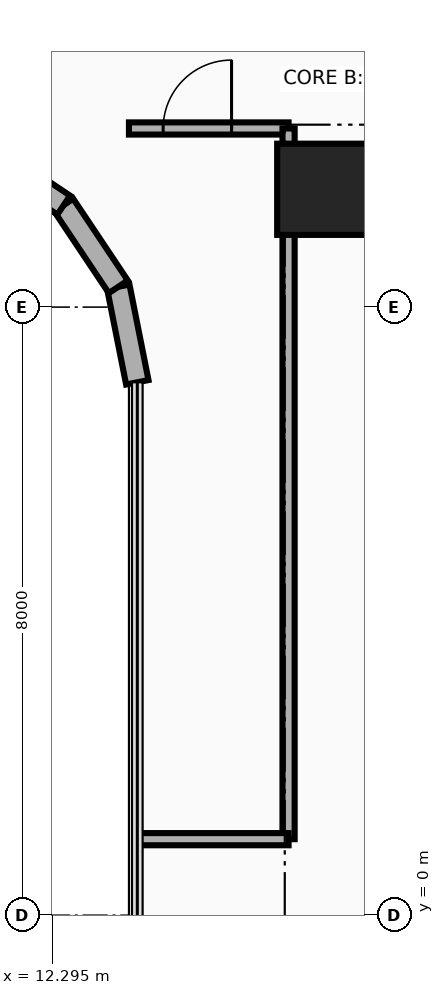
"""IFC4 building model, lengths in metres.
Left out: names, types, materials, properties, quantities, classifications, styles, units other than length and angle.
Written with IfcOpenShell. Run it as: python <this file> out.ifc"""

import sys

from ifc_helpers import new_model, si_unit, direction, frame, frame_2d, origin, origin_2d, place, context, subcontext, project, spatial, rectangle, extrude, source, transform, mapped, element, fill, save


model = new_model("IFC4")
c1 = context("Model", 3, precision=1e-05, world=origin(), true_north=direction((0.0, 1.0)))
c2 = subcontext(c1, "Body", "Model", "MODEL_VIEW")
j1 = project(units=[si_unit("LENGTHUNIT", "METRE"), si_unit("PLANEANGLEUNIT", "RADIAN")], contexts=[c1])
p1 = place(None, origin())
s1 = spatial("IfcSite", under=j1, at=p1, CompositionType="ELEMENT")
p2 = place(p1, origin())
s2 = spatial("IfcBuilding", under=s1, at=p2, CompositionType="ELEMENT")
p3 = place(p2, frame((0.0, 0.0, 135.3)))
s3 = spatial("IfcBuildingStorey", under=s2, at=p3, CompositionType="ELEMENT", Elevation=135.3)
p4 = place(p3, frame((15.85, 9.55, 0.0), z_axis=(0.0, 0.0, 1.0), x_axis=(1.0, 0.0, 0.0)))
e1 = element("IfcWall", 1, at=p4, inside=s3, PredefinedType="SHEAR", context=c2, shape_type="SweptSolid", body=[
    extrude(rectangle(XDim=9.0, YDim=0.7, at=frame_2d((4.5, 0.0))), origin(), (0.0, 0.0, 1.0), 3.46),
])
m1 = source(origin(), c2, "Body", "SweptSolid", [
    extrude(rectangle(XDim=1.2, YDim=1.2, at=origin_2d()), origin(), (0.0, 0.0, 1.0), 3.7),
])
p5 = place(p3, frame((15.85, 9.55, 0.0), z_axis=(0.0, 0.0, 1.0), x_axis=(1.0, 0.0, 0.0)))
e2 = element("IfcColumn", 2, at=p5, inside=s3, PredefinedType="COLUMN", context=c2, shape_type="MappedRepresentation", body=[
    mapped(m1, transform((0.0, 0.0, 0.0), x_axis=(1.0, 0.0, 0.0), y_axis=(0.0, 1.0, 0.0), z_axis=(0.0, 0.0, 1.0), scale=1.0)),
])
p6 = place(p3, frame((13.41, 7.011, 0.0), z_axis=(0.0, 0.0, 1.0), x_axis=(-0.195090163074, 0.980785312019, 0.0)))
e3 = element("IfcWall", 3, at=p6, inside=s3, PredefinedType="SOLIDWALL", context=c2, shape_type="SweptSolid", body=[
    extrude(rectangle(XDim=1.281, YDim=0.3, at=frame_2d((0.641, 0.0))), origin(), (0.0, 0.0, 1.0), 3.46),
])
for number, where, z_axis, x_axis in (
    (4, (13.16, 8.268, 0.0), (0.0, 0.0, 1.0), (-0.556, 0.831, 0.0)),
    (5, (12.442, 9.342, 0.0), (0.0, 0.0, 1.0), (-0.831, 0.556, 0.0)),
):
    element("IfcWall", number, at=place(p3, frame(where, z_axis=z_axis, x_axis=x_axis)), inside=s3, PredefinedType="SOLIDWALL", context=c2, shape_type="SweptSolid", body=[
        extrude(rectangle(XDim=1.292, YDim=0.3, at=frame_2d((0.646, 0.0))), origin(), (0.0, 0.0, 1.0), 3.46),
    ])
p7 = place(p3, frame((13.3, 10.35, 0.0), z_axis=(0.0, 0.0, 1.0), x_axis=(1.0, 0.0, 0.0)))
e6 = element("IfcWall", 6, at=p7, inside=s3, PredefinedType="PARTITIONING", context=c2, shape_type="SweptSolid", body=[
    extrude(rectangle(XDim=2.1, YDim=0.16, at=frame_2d((1.05, 0.0))), origin(), (0.0, 0.0, 1.0), 2.666),
])
p8 = place(p7, frame((0.45, 0.0, 0.0)))
e7 = element("IfcOpeningElement", 7, at=p8, cuts=e6, PredefinedType="OPENING", context=c2, shape_type="SweptSolid", body=[
    extrude(rectangle(XDim=0.9, YDim=2.1, at=frame_2d((0.45, 1.05))), frame((0.0, 0.095, 0.0), z_axis=(0.0, -1.0, 0.0), x_axis=(1.0, 0.0, 0.0)), (0.0, 0.0, 1.0), 0.19),
])
p9 = place(p3, frame((15.4, 1.0, 0.0), z_axis=(0.0, 0.0, 1.0), x_axis=(0.0, 1.0, 0.0)))
e8 = element("IfcWall", 8, at=p9, inside=s3, PredefinedType="PARTITIONING", context=c2, shape_type="SweptSolid", body=[
    extrude(rectangle(XDim=9.35, YDim=0.16, at=frame_2d((4.675, 0.0))), origin(), (0.0, 0.0, 1.0), 2.245),
])
p10 = place(p3, frame((13.41, 1.0, 0.0), z_axis=(0.0, 0.0, 1.0), x_axis=(1.0, 0.0, 0.0)))
e9 = element("IfcWall", 9, at=p10, inside=s3, PredefinedType="PARTITIONING", context=c2, shape_type="SweptSolid", body=[
    extrude(rectangle(XDim=1.99, YDim=0.16, at=frame_2d((0.995, 0.0))), origin(), (0.0, 0.0, 1.0), 2.245),
])
p11 = place(p8, origin())
e10 = element("IfcDoor", 10, at=p11, inside=s3, OperationType="SINGLE_SWING_LEFT", PredefinedType="DOOR", context=c2, shape_type="SweptSolid", body=[
    extrude(rectangle(XDim=0.9, YDim=2.1, at=frame_2d((0.45, 1.05))), frame((0.0, 0.025, 0.0), z_axis=(0.0, -1.0, 0.0), x_axis=(1.0, 0.0, 0.0)), (0.0, 0.0, 1.0), 0.05),
])
fill(e7, e10)
save(model, sys.argv[1])
